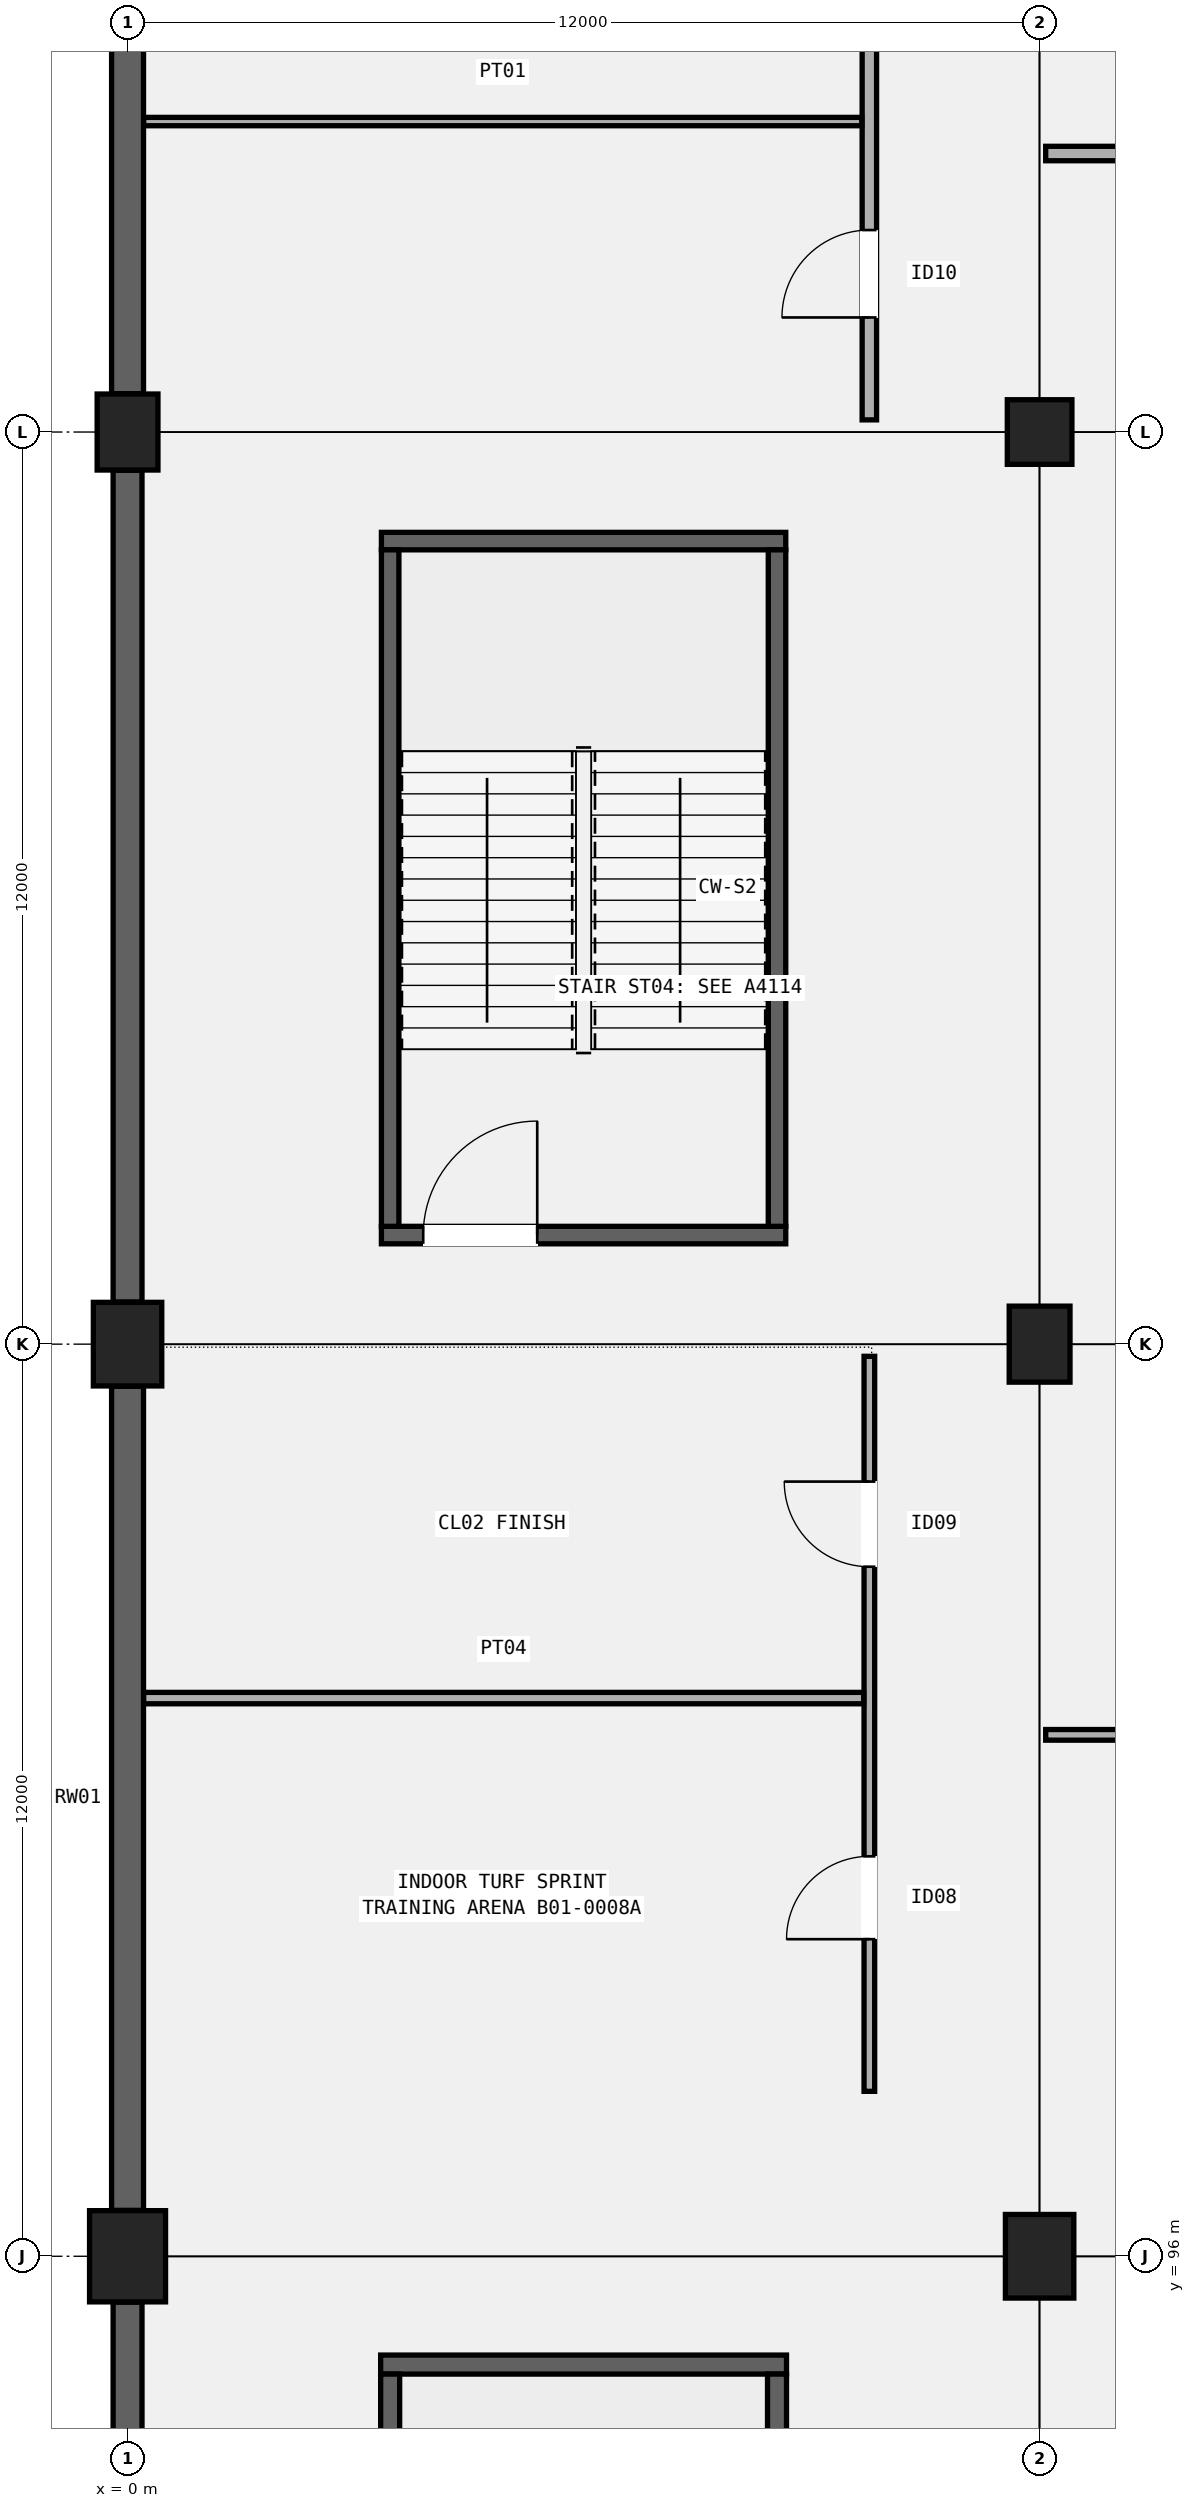
"""IFC4 building model, lengths in metres.
Left out: names, types, materials, properties, quantities, classifications, styles, units other than length and angle.
Written with IfcOpenShell. Run it as: python <this file> out.ifc"""

import sys

from ifc_helpers import new_model, si_unit, direction, frame, frame_2d, origin, origin_2d, place, context, subcontext, project, spatial, rectangle, circle, extrude, element, fill, save


model = new_model("IFC4")
c1 = context("Model", 3, precision=1e-05, world=origin(), true_north=direction((0.0, 1.0)))
c2 = subcontext(c1, "Body", "Model", "MODEL_VIEW")
j1 = project(units=[si_unit("LENGTHUNIT", "METRE"), si_unit("PLANEANGLEUNIT", "RADIAN")], contexts=[c1])
p1 = place(None, origin())
s1 = spatial("IfcSite", under=j1, at=p1, CompositionType="ELEMENT")
p2 = place(p1, origin())
s2 = spatial("IfcBuilding", under=s1, at=p2, CompositionType="ELEMENT")
p3 = place(p2, frame((0.0, 0.0, -4.8)))
s3 = spatial("IfcBuildingStorey", under=s2, at=p3, CompositionType="ELEMENT", Elevation=-4.8)
p4 = place(p3, frame((0.0, 96.0, 0.0), z_axis=(0.0, 0.0, 1.0), x_axis=(1.0, 0.0, 0.0)))
e1 = element("IfcColumn", 1, at=p4, inside=s3, PredefinedType="COLUMN", context=c2, shape_type="SweptSolid", body=[
    extrude(rectangle(XDim=1.0, YDim=1.2, at=origin_2d()), origin(), (0.0, 0.0, 1.0), 4.8),
])
p5 = place(p3, frame((0.0, 108.0, 0.0), z_axis=(0.0, 0.0, 1.0), x_axis=(1.0, 0.0, 0.0)))
e2 = element("IfcColumn", 2, at=p5, inside=s3, PredefinedType="COLUMN", context=c2, shape_type="SweptSolid", body=[
    extrude(rectangle(XDim=0.9, YDim=1.1, at=origin_2d()), origin(), (0.0, 0.0, 1.0), 4.8),
])
p6 = place(p3, frame((0.0, 120.0, 0.0), z_axis=(0.0, 0.0, 1.0), x_axis=(1.0, 0.0, 0.0)))
e3 = element("IfcColumn", 3, at=p6, inside=s3, PredefinedType="COLUMN", context=c2, shape_type="SweptSolid", body=[
    extrude(rectangle(XDim=0.8, YDim=1.0, at=origin_2d()), origin(), (0.0, 0.0, 1.0), 4.8),
])
p7 = place(p3, frame((12.0, 96.0, 0.0), z_axis=(0.0, 0.0, 1.0), x_axis=(1.0, 0.0, 0.0)))
e4 = element("IfcColumn", 4, at=p7, inside=s3, PredefinedType="COLUMN", context=c2, shape_type="SweptSolid", body=[
    extrude(rectangle(XDim=0.9, YDim=1.1, at=origin_2d()), origin(), (0.0, 0.0, 1.0), 4.8),
])
p8 = place(p3, frame((12.0, 108.0, 0.0), z_axis=(0.0, 0.0, 1.0), x_axis=(1.0, 0.0, 0.0)))
e5 = element("IfcColumn", 5, at=p8, inside=s3, PredefinedType="COLUMN", context=c2, shape_type="SweptSolid", body=[
    extrude(rectangle(XDim=0.8, YDim=1.0, at=origin_2d()), origin(), (0.0, 0.0, 1.0), 4.8),
])
p9 = place(p3, frame((12.0, 120.0, 0.0), z_axis=(0.0, 0.0, 1.0), x_axis=(1.0, 0.0, 0.0)))
e6 = element("IfcColumn", 6, at=p9, inside=s3, PredefinedType="COLUMN", context=c2, shape_type="SweptSolid", body=[
    extrude(circle(Radius=0.425, at=origin_2d()), origin(), (0.0, 0.0, 1.0), 4.8),
])
p10 = place(p3, frame((0.0, 84.429, 0.0), z_axis=(0.0, 0.0, 1.0), x_axis=(0.0, 1.0, 0.0)))
e7 = element("IfcWall", 7, at=p10, inside=s3, PredefinedType="STANDARD", context=c2, shape_type="SweptSolid", body=[
    extrude(rectangle(XDim=10.967, YDim=0.38, at=frame_2d((5.483, 0.0))), origin(), (0.0, 0.0, 1.0), 4.46),
])
p11 = place(p3, frame((0.0, 96.604, 0.0), z_axis=(0.0, 0.0, 1.0), x_axis=(0.0, 1.0, 0.0)))
e8 = element("IfcWall", 8, at=p11, inside=s3, PredefinedType="STANDARD", context=c2, shape_type="SweptSolid", body=[
    extrude(rectangle(XDim=10.842, YDim=0.42, at=frame_2d((5.421, 0.0))), origin(), (0.0, 0.0, 1.0), 4.46),
])
p12 = place(p3, frame((0.0, 108.554, 0.0), z_axis=(0.0, 0.0, 1.0), x_axis=(0.0, 1.0, 0.0)))
e9 = element("IfcWall", 9, at=p12, inside=s3, PredefinedType="STANDARD", context=c2, shape_type="SweptSolid", body=[
    extrude(rectangle(XDim=10.942, YDim=0.38, at=frame_2d((5.471, 0.0))), origin(), (0.0, 0.0, 1.0), 4.46),
])
p13 = place(p3, frame((0.0, 120.504, 0.0), z_axis=(0.0, 0.0, 1.0), x_axis=(0.0, 1.0, 0.0)))
e10 = element("IfcWall", 10, at=p13, inside=s3, PredefinedType="STANDARD", context=c2, shape_type="SweptSolid", body=[
    extrude(rectangle(XDim=11.067, YDim=0.42, at=frame_2d((5.534, 0.0))), origin(), (0.0, 0.0, 1.0), 4.46),
])
p14 = place(p3, frame((3.33, 94.575, 0.0), z_axis=(0.0, 0.0, 1.0), x_axis=(1.0, 0.0, 0.0)))
e11 = element("IfcWall", 11, at=p14, inside=s3, PredefinedType="SHEAR", context=c2, shape_type="SweptSolid", body=[
    extrude(rectangle(XDim=5.34, YDim=0.25, at=frame_2d((2.67, 0.0))), origin(), (0.0, 0.0, 1.0), 4.5),
])
for number, where, z_axis, x_axis in (
    (12, (3.455, 85.55, 0.0), (0.0, 0.0, 1.0), (0.0, 1.0, 0.0)),
    (13, (8.545, 85.55, 0.0), (0.0, 0.0, 1.0), (0.0, 1.0, 0.0)),
):
    element("IfcWall", number, at=place(p3, frame(where, z_axis=z_axis, x_axis=x_axis)), inside=s3, PredefinedType="SHEAR", context=c2, shape_type="SweptSolid", body=[
        extrude(rectangle(XDim=8.9, YDim=0.25, at=frame_2d((4.45, 0.0))), origin(), (0.0, 0.0, 1.0), 4.5),
    ])
p15 = place(p3, frame((3.34, 109.435, 0.0), z_axis=(0.0, 0.0, 1.0), x_axis=(1.0, 0.0, 0.0)))
e14 = element("IfcWall", 14, at=p15, inside=s3, PredefinedType="SHEAR", context=c2, shape_type="SweptSolid", body=[
    extrude(rectangle(XDim=5.32, YDim=0.23, at=frame_2d((2.66, 0.0))), origin(), (0.0, 0.0, 1.0), 4.5),
])
p16 = place(p15, frame((0.55, 0.0, 0.0)))
e15 = element("IfcOpeningElement", 15, at=p16, cuts=e14, PredefinedType="OPENING", context=c2, shape_type="SweptSolid", body=[
    extrude(rectangle(XDim=1.5, YDim=2.2, at=frame_2d((0.75, 1.1))), frame((0.0, 0.125, 0.0), z_axis=(0.0, -1.0, 0.0), x_axis=(1.0, 0.0, 0.0)), (0.0, 0.0, 1.0), 0.25),
])
p17 = place(p3, frame((3.34, 118.565, 0.0), z_axis=(0.0, 0.0, 1.0), x_axis=(1.0, 0.0, 0.0)))
e16 = element("IfcWall", 16, at=p17, inside=s3, PredefinedType="SHEAR", context=c2, shape_type="SweptSolid", body=[
    extrude(rectangle(XDim=5.32, YDim=0.23, at=frame_2d((2.66, 0.0))), origin(), (0.0, 0.0, 1.0), 4.5),
])
for number, where, z_axis, x_axis in (
    (17, (3.455, 109.55, 0.0), (0.0, 0.0, 1.0), (0.0, 1.0, 0.0)),
    (18, (8.545, 109.55, 0.0), (0.0, 0.0, 1.0), (0.0, 1.0, 0.0)),
):
    element("IfcWall", number, at=place(p3, frame(where, z_axis=z_axis, x_axis=x_axis)), inside=s3, PredefinedType="SHEAR", context=c2, shape_type="SweptSolid", body=[
        extrude(rectangle(XDim=8.9, YDim=0.23, at=frame_2d((4.45, 0.0))), origin(), (0.0, 0.0, 1.0), 4.5),
    ])
p18 = place(p3, frame((9.76, 98.17, 0.0), z_axis=(0.0, 0.0, 1.0), x_axis=(0.0, 1.0, 0.0)))
e19 = element("IfcWall", 19, at=p18, inside=s3, PredefinedType="PARTITIONING", context=c2, shape_type="SweptSolid", body=[
    extrude(rectangle(XDim=9.67, YDim=0.14, at=frame_2d((4.835, 0.0))), origin(), (0.0, 0.0, 1.0), 3.92),
])
p19 = place(p18, frame((2.002, 0.0, 0.0)))
e20 = element("IfcOpeningElement", 20, at=p19, cuts=e19, PredefinedType="OPENING", context=c2, shape_type="SweptSolid", body=[
    extrude(rectangle(XDim=1.09, YDim=2.16, at=frame_2d((0.545, 1.08))), frame((0.0, 0.08, 0.0), z_axis=(0.0, -1.0, 0.0), x_axis=(1.0, 0.0, 0.0)), (0.0, 0.0, 1.0), 0.16),
])
p20 = place(p18, frame((6.902, 0.0, 0.0)))
e21 = element("IfcOpeningElement", 21, at=p20, cuts=e19, PredefinedType="OPENING", context=c2, shape_type="SweptSolid", body=[
    extrude(rectangle(XDim=1.12, YDim=2.18, at=frame_2d((0.56, 1.09))), frame((0.0, 0.08, 0.0), z_axis=(0.0, -1.0, 0.0), x_axis=(1.0, 0.0, 0.0)), (0.0, 0.0, 1.0), 0.16),
])
p21 = place(p3, frame((0.212, 103.344, 0.0), z_axis=(0.0, 0.0, 1.0), x_axis=(1.0, 0.0, 0.0)))
e22 = element("IfcWall", 22, at=p21, inside=s3, PredefinedType="PARTITIONING", context=c2, shape_type="SweptSolid", body=[
    extrude(rectangle(XDim=9.473, YDim=0.15, at=frame_2d((4.737, 0.0))), origin(), (0.0, 0.0, 1.0), 3.92),
])
p22 = place(p3, frame((9.76, 120.16, 0.0), z_axis=(0.0, 0.0, 1.0), x_axis=(0.0, 1.0, 0.0)))
e23 = element("IfcWall", 23, at=p22, inside=s3, PredefinedType="PARTITIONING", context=c2, shape_type="SweptSolid", body=[
    extrude(rectangle(XDim=11.68, YDim=0.19, at=frame_2d((5.84, 0.0))), origin(), (0.0, 0.0, 1.0), 3.92),
])
p23 = place(p22, frame((1.347, 0.0, 0.0)))
e24 = element("IfcOpeningElement", 24, at=p23, cuts=e23, PredefinedType="OPENING", context=c2, shape_type="SweptSolid", body=[
    extrude(rectangle(XDim=1.15, YDim=2.15, at=frame_2d((0.575, 1.075))), frame((0.0, 0.105, 0.0), z_axis=(0.0, -1.0, 0.0), x_axis=(1.0, 0.0, 0.0)), (0.0, 0.0, 1.0), 0.21),
])
p24 = place(p22, frame((7.252, 0.0, 0.0)))
e25 = element("IfcOpeningElement", 25, at=p24, cuts=e23, PredefinedType="OPENING", context=c2, shape_type="SweptSolid", body=[
    extrude(rectangle(XDim=1.18, YDim=2.2, at=frame_2d((0.59, 1.1))), frame((0.0, 0.105, 0.0), z_axis=(0.0, -1.0, 0.0), x_axis=(1.0, 0.0, 0.0)), (0.0, 0.0, 1.0), 0.21),
])
p25 = place(p3, frame((0.212, 124.084, 0.0), z_axis=(0.0, 0.0, 1.0), x_axis=(1.0, 0.0, 0.0)))
e26 = element("IfcWall", 26, at=p25, inside=s3, PredefinedType="PARTITIONING", context=c2, shape_type="SweptSolid", body=[
    extrude(rectangle(XDim=9.448, YDim=0.11, at=frame_2d((4.724, 0.0))), origin(), (0.0, 0.0, 1.0), 3.92),
])
p26 = place(p3, frame((12.08, 102.86, 0.0), z_axis=(0.0, 0.0, 1.0), x_axis=(1.0, 0.0, 0.0)))
e27 = element("IfcWall", 27, at=p26, inside=s3, PredefinedType="PARTITIONING", context=c2, shape_type="SweptSolid", body=[
    extrude(rectangle(XDim=9.615, YDim=0.14, at=frame_2d((4.808, 0.0))), origin(), (0.0, 0.0, 1.0), 3.92),
])
p27 = place(p3, frame((12.08, 123.664, 0.0), z_axis=(0.0, 0.0, 1.0), x_axis=(1.0, 0.0, 0.0)))
e28 = element("IfcWall", 28, at=p27, inside=s3, PredefinedType="PARTITIONING", context=c2, shape_type="SweptSolid", body=[
    extrude(rectangle(XDim=9.59, YDim=0.19, at=frame_2d((4.795, 0.0))), origin(), (0.0, 0.0, 1.0), 3.92),
])
p28 = place(p16, origin())
e29 = element("IfcDoor", 29, at=p28, inside=s3, OperationType="SINGLE_SWING_RIGHT", PredefinedType="DOOR", context=c2, shape_type="SweptSolid", body=[
    extrude(rectangle(XDim=1.5, YDim=2.2, at=frame_2d((0.75, 1.1))), frame((0.0, 0.025, 0.0), z_axis=(0.0, -1.0, 0.0), x_axis=(1.0, 0.0, 0.0)), (0.0, 0.0, 1.0), 0.05),
])
fill(e15, e29)
p29 = place(p19, origin())
e30 = element("IfcDoor", 30, at=p29, inside=s3, OperationType="SINGLE_SWING_LEFT", PredefinedType="DOOR", context=c2, shape_type="SweptSolid", body=[
    extrude(rectangle(XDim=1.09, YDim=2.16, at=frame_2d((0.545, 1.08))), frame((0.0, 0.025, 0.0), z_axis=(0.0, -1.0, 0.0), x_axis=(1.0, 0.0, 0.0)), (0.0, 0.0, 1.0), 0.05),
])
fill(e20, e30)
p30 = place(p20, origin())
e31 = element("IfcDoor", 31, at=p30, inside=s3, OperationType="SINGLE_SWING_RIGHT", PredefinedType="DOOR", context=c2, shape_type="SweptSolid", body=[
    extrude(rectangle(XDim=1.12, YDim=2.18, at=frame_2d((0.56, 1.09))), frame((0.0, 0.025, 0.0), z_axis=(0.0, -1.0, 0.0), x_axis=(1.0, 0.0, 0.0)), (0.0, 0.0, 1.0), 0.05),
])
fill(e21, e31)
p31 = place(p23, origin())
e32 = element("IfcDoor", 32, at=p31, inside=s3, OperationType="SINGLE_SWING_LEFT", PredefinedType="DOOR", context=c2, shape_type="SweptSolid", body=[
    extrude(rectangle(XDim=1.15, YDim=2.15, at=frame_2d((0.575, 1.075))), frame((0.0, 0.025, 0.0), z_axis=(0.0, -1.0, 0.0), x_axis=(1.0, 0.0, 0.0)), (0.0, 0.0, 1.0), 0.05),
])
fill(e24, e32)
save(model, sys.argv[1])
